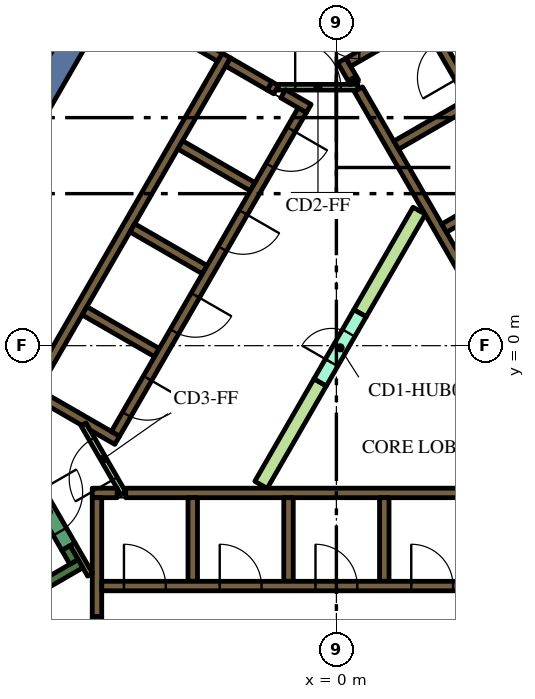
"""IFC4 building model, lengths in metres.
Left out: names, types, materials, properties, quantities, classifications, styles, units other than length and angle.
Written with IfcOpenShell. Run it as: python <this file> out.ifc"""

import sys

from ifc_helpers import new_model, si_unit, direction, frame, frame_2d, origin, place, context, subcontext, project, spatial, polyline, rectangle, outline, extrude, element, fill, save


model = new_model("IFC4")
c1 = context("Model", 3, precision=1e-05, world=origin(), true_north=direction((0.0, 1.0)))
c2 = subcontext(c1, "Body", "Model", "MODEL_VIEW")
j1 = project(units=[si_unit("LENGTHUNIT", "METRE"), si_unit("PLANEANGLEUNIT", "RADIAN")], contexts=[c1])
p1 = place(None, origin())
s1 = spatial("IfcSite", under=j1, at=p1, CompositionType="ELEMENT")
p2 = place(p1, origin())
s2 = spatial("IfcBuilding", under=s1, at=p2, CompositionType="ELEMENT")
p3 = place(p2, frame((0.0, 0.0, 256.2)))
s3 = spatial("IfcBuildingStorey", under=s2, at=p3, CompositionType="ELEMENT", Elevation=256.2)
p4 = place(p3, frame((-12.625, -1.867, 0.0), z_axis=(0.0, 0.0, 1.0), x_axis=(0.499996974394, 0.866027150612, 0.0)))
e1 = element("IfcWall", 1, at=p4, inside=s3, PredefinedType="SOLIDWALL", context=c2, shape_type="SweptSolid", body=[
    extrude(rectangle(XDim=15.858, YDim=0.7, at=frame_2d((7.929, 0.0))), origin(), (0.0, 0.0, 1.0), 5.4),
])
p5 = place(p3, frame((-12.84, -9.261, 0.0), z_axis=(0.0, 0.0, 1.0), x_axis=(0.866016039709, 0.500016218704, 0.0)))
e2 = element("IfcWall", 2, at=p5, inside=s3, PredefinedType="SOLIDWALL", context=c2, shape_type="SweptSolid", body=[
    extrude(rectangle(XDim=7.05, YDim=0.25, at=frame_2d((3.525, 0.0))), origin(), (0.0, 0.0, 1.0), 5.4),
])
p6 = place(p3, frame((-6.905, -5.69, 0.0), z_axis=(0.0, 0.0, 1.0), x_axis=(-0.500402024738, 0.865793170242, 0.0)))
e3 = element("IfcWall", 3, at=p6, inside=s3, PredefinedType="SOLIDWALL", context=c2, shape_type="SweptSolid", body=[
    extrude(rectangle(XDim=0.425, YDim=0.25, at=frame_2d((0.212, 0.0))), origin(), (0.0, 0.0, 1.0), 5.4),
])
p7 = place(p3, frame((-5.545, -3.875, 0.0), z_axis=(0.0, 0.0, 1.0), x_axis=(1.0, 0.0, 0.0)))
e4 = element("IfcWall", 4, at=p7, inside=s3, PredefinedType="SOLIDWALL", context=c2, shape_type="SweptSolid", body=[
    extrude(rectangle(XDim=11.97, YDim=0.25, at=frame_2d((5.985, 0.0))), origin(), (0.0, 0.0, 1.0), 5.4),
])
p8 = place(p3, frame((-6.425, -3.875, 0.0), z_axis=(0.0, 0.0, 1.0), x_axis=(1.0, 0.0, 0.0)))
e5 = element("IfcWall", 5, at=p8, inside=s3, PredefinedType="SOLIDWALL", context=c2, shape_type="SweptSolid", body=[
    extrude(rectangle(XDim=0.658, YDim=0.25, at=frame_2d((0.329, 0.0))), origin(), (0.0, 0.0, 1.0), 5.4),
])
for number, where, z_axis, x_axis in (
    (6, (1.26, -4.0, 0.0), (0.0, 0.0, 1.0), (0.0, -1.0, 0.0)),
    (7, (-1.26, -4.0, 0.0), (0.0, 0.0, 1.0), (0.0, -1.0, 0.0)),
    (8, (-3.78, -4.0, 0.0), (0.0, 0.0, 1.0), (0.0, -1.0, 0.0)),
):
    element("IfcWall", number, at=place(p3, frame(where, z_axis=z_axis, x_axis=x_axis)), inside=s3, PredefinedType="SOLIDWALL", context=c2, shape_type="SweptSolid", body=[
        extrude(rectangle(XDim=2.2, YDim=0.25, at=frame_2d((1.1, 0.0))), origin(), (0.0, 0.0, 1.0), 5.4),
    ])
p9 = place(p3, frame((-6.3, -7.125, 0.0), z_axis=(0.0, 0.0, 1.0), x_axis=(0.0, 1.0, 0.0)))
e9 = element("IfcWall", 9, at=p9, inside=s3, PredefinedType="SOLIDWALL", context=c2, shape_type="SweptSolid", body=[
    extrude(rectangle(XDim=3.125, YDim=0.25, at=frame_2d((1.562, 0.0))), origin(), (0.0, 0.0, 1.0), 5.4),
])
p10 = place(p3, frame((0.473, 6.93, 0.0), z_axis=(0.0, 0.0, 1.0), x_axis=(-0.49972245349, 0.866185586049, 0.0)))
e10 = element("IfcWall", 10, at=p10, inside=s3, PredefinedType="SOLIDWALL", context=c2, shape_type="SweptSolid", body=[
    extrude(rectangle(XDim=0.11, YDim=0.25, at=frame_2d((0.055, 0.0))), origin(), (0.0, 0.0, 1.0), 5.4),
])
p11 = place(p3, frame((6.568, -3.627, 0.0), z_axis=(0.0, 0.0, 1.0), x_axis=(-0.499999455981, 0.866025717874, 0.0)))
e11 = element("IfcWall", 11, at=p11, inside=s3, PredefinedType="SOLIDWALL", context=c2, shape_type="SweptSolid", body=[
    extrude(rectangle(XDim=11.978, YDim=0.25, at=frame_2d((5.989, 0.0))), origin(), (0.0, 0.0, 1.0), 5.4),
])
p12 = place(p3, frame((0.417, 7.027, 0.0), z_axis=(0.0, 0.0, 1.0), x_axis=(-0.500210807569, 0.865903659763, 0.0)))
e12 = element("IfcWall", 12, at=p12, inside=s3, PredefinedType="SOLIDWALL", context=c2, shape_type="SweptSolid", body=[
    extrude(rectangle(XDim=0.548, YDim=0.25, at=frame_2d((0.274, 0.0))), origin(), (0.0, 0.0, 1.0), 5.4),
])
p13 = place(p3, frame((3.647, 9.38, 0.0), z_axis=(0.0, 0.0, 1.0), x_axis=(-0.866025015791, -0.500000672024, 0.0)))
e13 = element("IfcWall", 13, at=p13, inside=s3, PredefinedType="SOLIDWALL", context=c2, shape_type="SweptSolid", body=[
    extrude(rectangle(XDim=3.849, YDim=0.25, at=frame_2d((1.924, 0.0))), origin(), (0.0, 0.0, 1.0), 5.4),
])
p14 = place(p3, frame((1.574, 5.274, 0.0), z_axis=(0.0, 0.0, 1.0), x_axis=(0.866028486751, 0.499994660107, 0.0)))
e14 = element("IfcWall", 14, at=p14, inside=s3, PredefinedType="SOLIDWALL", context=c2, shape_type="SweptSolid", body=[
    extrude(rectangle(XDim=2.2, YDim=0.25, at=frame_2d((1.1, 0.0))), origin(), (0.0, 0.0, 1.0), 5.4),
])
p15 = place(p3, frame((2.834, 3.091, 0.0), z_axis=(0.0, 0.0, 1.0), x_axis=(0.866008176907, 0.50002983664, 0.0)))
e15 = element("IfcWall", 15, at=p15, inside=s3, PredefinedType="SOLIDWALL", context=c2, shape_type="SweptSolid", body=[
    extrude(rectangle(XDim=2.2, YDim=0.25, at=frame_2d((1.1, 0.0))), origin(), (0.0, 0.0, 1.0), 5.4),
])
p16 = place(p3, frame((-8.06, -1.311, 0.0), z_axis=(0.0, 0.0, 1.0), x_axis=(0.50000273126, 0.866023826885, 0.0)))
e16 = element("IfcWall", 16, at=p16, inside=s3, PredefinedType="SOLIDWALL", context=c2, shape_type="SweptSolid", body=[
    extrude(rectangle(XDim=10.33, YDim=0.25, at=frame_2d((5.165, 0.0))), origin(), (0.0, 0.0, 1.0), 5.4),
])
p17 = place(p3, frame((-1.758, 6.835, 0.0), z_axis=(0.0, 0.0, 1.0), x_axis=(0.865982457891, -0.500074377092, 0.0)))
e17 = element("IfcWall", 17, at=p17, inside=s3, PredefinedType="SOLIDWALL", context=c2, shape_type="SweptSolid", body=[
    extrude(rectangle(XDim=0.2, YDim=0.25, at=frame_2d((0.1, 0.0))), origin(), (0.0, 0.0, 1.0), 5.4),
])
p18 = place(p3, frame((-1.76, 6.836, 0.0), z_axis=(0.0, 0.0, 1.0), x_axis=(-0.865952863304, 0.500125622755, 0.0)))
e18 = element("IfcWall", 18, at=p18, inside=s3, PredefinedType="SOLIDWALL", context=c2, shape_type="SweptSolid", body=[
    extrude(rectangle(XDim=1.258, YDim=0.25, at=frame_2d((0.629, 0.0))), origin(), (0.0, 0.0, 1.0), 5.4),
])
p19 = place(p3, frame((-0.728, 6.24, 0.0), z_axis=(0.0, 0.0, 1.0), x_axis=(-0.865955664968, 0.500120771724, 0.0)))
e19 = element("IfcWall", 19, at=p19, inside=s3, PredefinedType="SOLIDWALL", context=c2, shape_type="SweptSolid", body=[
    extrude(rectangle(XDim=0.778, YDim=0.25, at=frame_2d((0.389, 0.0))), origin(), (0.0, 0.0, 1.0), 5.4),
])
for number, where, z_axis, x_axis in (
    (20, (-2.204, 4.182, 0.0), (0.0, 0.0, 1.0), (-0.866, 0.5, 0.0)),
    (21, (-5.369, 3.1, 0.0), (0.0, 0.0, 1.0), (0.866, -0.5, 0.0)),
    (22, (-4.724, -0.182, 0.0), (0.0, 0.0, 1.0), (-0.866, 0.5, 0.0)),
):
    element("IfcWall", number, at=place(p3, frame(where, z_axis=z_axis, x_axis=x_axis)), inside=s3, PredefinedType="SOLIDWALL", context=c2, shape_type="SweptSolid", body=[
        extrude(rectangle(XDim=2.2, YDim=0.25, at=frame_2d((1.1, 0.0))), origin(), (0.0, 0.0, 1.0), 5.4),
    ])
p20 = place(p3, origin())
e23 = element("IfcWall", 23, at=p20, inside=s3, PredefinedType="SOLIDWALL", context=c2, shape_type="SweptSolid", body=[
    extrude(outline(polyline([(-5.922, -2.257), (-5.922, -2.257), (-5.705, -2.382), (-5.83, -2.598), (-6.483, -2.221), (-6.591, -2.033), (-6.591, -2.033), (-6.7, -2.096), (-7.952, -1.373), (-7.827, -1.156), (-5.922, -2.257)])), origin(), (0.0, 0.0, 1.0), 5.4),
])
p21 = place(p3, frame((-3.066, 7.59, 0.0), z_axis=(0.0, 0.0, 1.0), x_axis=(-0.866081358704, 0.49990307071, 0.0)))
e24 = element("IfcWall", 24, at=p21, inside=s3, PredefinedType="SOLIDWALL", context=c2, shape_type="SweptSolid", body=[
    extrude(rectangle(XDim=0.858, YDim=0.25, at=frame_2d((0.429, 0.0))), origin(), (0.0, 0.0, 1.0), 5.4),
])
p22 = place(p3, frame((-6.48, -6.027, 0.0), z_axis=(0.0, 0.0, 1.0), x_axis=(-0.499927229454, 0.866067413802, 0.0)))
e25 = element("IfcWall", 25, at=p22, inside=s3, PredefinedType="PARTITIONING", context=c2, shape_type="SweptSolid", body=[
    extrude(rectangle(XDim=0.929, YDim=0.15, at=frame_2d((0.464, 0.0))), origin(), (0.0, 0.0, 1.0), 5.4),
])
e26 = element("IfcWall", 26, at=p20, inside=s3, PredefinedType="PARTITIONING", context=c2, shape_type="SweptSolid", body=[
    extrude(outline(polyline([(2.017, 3.643), (2.342, 3.456), (0.785, 0.76), (0.46, 0.947), (2.017, 3.643)])), origin(), (0.0, 0.0, 1.0), 4.3),
])
e27 = element("IfcWall", 27, at=p20, inside=s3, PredefinedType="PARTITIONING", context=c2, shape_type="SweptSolid", body=[
    extrude(outline(polyline([(-0.59, -0.872), (-0.265, -1.059), (-1.822, -3.756), (-2.147, -3.568), (-0.59, -0.872)])), origin(), (0.0, 0.0, 1.0), 4.3),
])
p23 = place(p3, frame((-6.175, -6.325, 0.0), z_axis=(0.0, 0.0, 1.0), x_axis=(1.0, 0.0, 0.0)))
e28 = element("IfcWall", 28, at=p23, inside=s3, PredefinedType="SOLIDWALL", context=c2, shape_type="SweptSolid", body=[
    extrude(rectangle(XDim=12.35, YDim=0.25, at=frame_2d((6.175, 0.0))), origin(), (0.0, 0.0, 1.0), 5.4),
])
p24 = place(p23, frame((0.585, 0.0, 0.0)))
e29 = element("IfcOpeningElement", 29, at=p24, cuts=e28, PredefinedType="OPENING", context=c2, shape_type="SweptSolid", body=[
    extrude(rectangle(XDim=1.1, YDim=2.1, at=frame_2d((0.55, 1.05))), frame((0.0, 0.135, 0.0), z_axis=(0.0, -1.0, 0.0), x_axis=(1.0, 0.0, 0.0)), (0.0, 0.0, 1.0), 0.27),
])
p25 = place(p23, frame((3.105, 0.0, 0.0)))
e30 = element("IfcOpeningElement", 30, at=p25, cuts=e28, PredefinedType="OPENING", context=c2, shape_type="SweptSolid", body=[
    extrude(rectangle(XDim=1.1, YDim=2.1, at=frame_2d((0.55, 1.05))), frame((0.0, 0.135, 0.0), z_axis=(0.0, -1.0, 0.0), x_axis=(1.0, 0.0, 0.0)), (0.0, 0.0, 1.0), 0.27),
])
p26 = place(p23, frame((5.625, 0.0, 0.0)))
e31 = element("IfcOpeningElement", 31, at=p26, cuts=e28, PredefinedType="OPENING", context=c2, shape_type="SweptSolid", body=[
    extrude(rectangle(XDim=1.1, YDim=2.1, at=frame_2d((0.55, 1.05))), frame((0.0, 0.135, 0.0), z_axis=(0.0, -1.0, 0.0), x_axis=(1.0, 0.0, 0.0)), (0.0, 0.0, 1.0), 0.27),
])
p27 = place(p23, frame((8.145, 0.0, 0.0)))
e32 = element("IfcOpeningElement", 32, at=p27, cuts=e28, PredefinedType="OPENING", context=c2, shape_type="SweptSolid", body=[
    extrude(rectangle(XDim=1.1, YDim=2.1, at=frame_2d((0.55, 1.05))), frame((0.0, 0.135, 0.0), z_axis=(0.0, -1.0, 0.0), x_axis=(1.0, 0.0, 0.0)), (0.0, 0.0, 1.0), 0.27),
])
p28 = place(p23, frame((10.665, 0.0, 0.0)))
e33 = element("IfcOpeningElement", 33, at=p28, cuts=e28, PredefinedType="OPENING", context=c2, shape_type="SweptSolid", body=[
    extrude(rectangle(XDim=1.1, YDim=2.1, at=frame_2d((0.55, 1.05))), frame((0.0, 0.135, 0.0), z_axis=(0.0, -1.0, 0.0), x_axis=(1.0, 0.0, 0.0)), (0.0, 0.0, 1.0), 0.27),
])
p29 = place(p3, frame((8.565, -2.185, 0.0), z_axis=(0.0, 0.0, 1.0), x_axis=(-0.499997954832, 0.866026584559, 0.0)))
e34 = element("IfcWall", 34, at=p29, inside=s3, PredefinedType="SOLIDWALL", context=c2, shape_type="SweptSolid", body=[
    extrude(rectangle(XDim=12.35, YDim=0.25, at=frame_2d((6.175, 0.0))), origin(), (0.0, 0.0, 1.0), 5.4),
])
p30 = place(p29, frame((0.585, 0.0, 0.0)))
e35 = element("IfcOpeningElement", 35, at=p30, cuts=e34, PredefinedType="OPENING", context=c2, shape_type="SweptSolid", body=[
    extrude(rectangle(XDim=1.1, YDim=2.1, at=frame_2d((0.55, 1.05))), frame((0.0, 0.135, 0.0), z_axis=(0.0, -1.0, 0.0), x_axis=(1.0, 0.0, 0.0)), (0.0, 0.0, 1.0), 0.27),
])
p31 = place(p29, frame((3.105, 0.0, 0.0)))
e36 = element("IfcOpeningElement", 36, at=p31, cuts=e34, PredefinedType="OPENING", context=c2, shape_type="SweptSolid", body=[
    extrude(rectangle(XDim=1.1, YDim=2.1, at=frame_2d((0.55, 1.05))), frame((0.0, 0.135, 0.0), z_axis=(0.0, -1.0, 0.0), x_axis=(1.0, 0.0, 0.0)), (0.0, 0.0, 1.0), 0.27),
])
p32 = place(p29, frame((5.625, 0.0, 0.0)))
e37 = element("IfcOpeningElement", 37, at=p32, cuts=e34, PredefinedType="OPENING", context=c2, shape_type="SweptSolid", body=[
    extrude(rectangle(XDim=1.1, YDim=2.1, at=frame_2d((0.55, 1.05))), frame((0.0, 0.135, 0.0), z_axis=(0.0, -1.0, 0.0), x_axis=(1.0, 0.0, 0.0)), (0.0, 0.0, 1.0), 0.27),
])
p33 = place(p29, frame((8.145, 0.0, 0.0)))
e38 = element("IfcOpeningElement", 38, at=p33, cuts=e34, PredefinedType="OPENING", context=c2, shape_type="SweptSolid", body=[
    extrude(rectangle(XDim=1.1, YDim=2.1, at=frame_2d((0.55, 1.05))), frame((0.0, 0.135, 0.0), z_axis=(0.0, -1.0, 0.0), x_axis=(1.0, 0.0, 0.0)), (0.0, 0.0, 1.0), 0.27),
])
p34 = place(p29, frame((10.665, 0.0, 0.0)))
e39 = element("IfcOpeningElement", 39, at=p34, cuts=e34, PredefinedType="OPENING", context=c2, shape_type="SweptSolid", body=[
    extrude(rectangle(XDim=1.1, YDim=2.1, at=frame_2d((0.55, 1.05))), frame((0.0, 0.135, 0.0), z_axis=(0.0, -1.0, 0.0), x_axis=(1.0, 0.0, 0.0)), (0.0, 0.0, 1.0), 0.27),
])
p35 = place(p3, frame((-0.898, 6.194, 0.0), z_axis=(0.0, 0.0, 1.0), x_axis=(-0.499996202215, -0.866027596426, 0.0)))
e40 = element("IfcWall", 40, at=p35, inside=s3, PredefinedType="SOLIDWALL", context=c2, shape_type="SweptSolid", body=[
    extrude(rectangle(XDim=9.83, YDim=0.25, at=frame_2d((4.915, 0.0))), origin(), (0.0, 0.0, 1.0), 5.4),
])
p36 = place(p35, frame((0.585, 0.0, 0.0)))
e41 = element("IfcOpeningElement", 41, at=p36, cuts=e40, PredefinedType="OPENING", context=c2, shape_type="SweptSolid", body=[
    extrude(rectangle(XDim=1.1, YDim=2.1, at=frame_2d((0.55, 1.05))), frame((0.0, 0.135, 0.0), z_axis=(0.0, -1.0, 0.0), x_axis=(1.0, 0.0, 0.0)), (0.0, 0.0, 1.0), 0.27),
])
p37 = place(p35, frame((3.105, 0.0, 0.0)))
e42 = element("IfcOpeningElement", 42, at=p37, cuts=e40, PredefinedType="OPENING", context=c2, shape_type="SweptSolid", body=[
    extrude(rectangle(XDim=1.1, YDim=2.1, at=frame_2d((0.55, 1.05))), frame((0.0, 0.135, 0.0), z_axis=(0.0, -1.0, 0.0), x_axis=(1.0, 0.0, 0.0)), (0.0, 0.0, 1.0), 0.27),
])
p38 = place(p35, frame((5.625, 0.0, 0.0)))
e43 = element("IfcOpeningElement", 43, at=p38, cuts=e40, PredefinedType="OPENING", context=c2, shape_type="SweptSolid", body=[
    extrude(rectangle(XDim=1.1, YDim=2.1, at=frame_2d((0.55, 1.05))), frame((0.0, 0.135, 0.0), z_axis=(0.0, -1.0, 0.0), x_axis=(1.0, 0.0, 0.0)), (0.0, 0.0, 1.0), 0.27),
])
p39 = place(p35, frame((8.145, 0.0, 0.0)))
e44 = element("IfcOpeningElement", 44, at=p39, cuts=e40, PredefinedType="OPENING", context=c2, shape_type="SweptSolid", body=[
    extrude(rectangle(XDim=1.1, YDim=2.1, at=frame_2d((0.55, 1.05))), frame((0.0, 0.135, 0.0), z_axis=(0.0, -1.0, 0.0), x_axis=(1.0, 0.0, 0.0)), (0.0, 0.0, 1.0), 0.27),
])
p40 = place(p3, frame((-8.103, -3.466, 0.0), z_axis=(0.0, 0.0, 1.0), x_axis=(0.500078061341, -0.865980330357, 0.0)))
e45 = element("IfcWall", 45, at=p40, inside=s3, PredefinedType="SOLIDWALL", context=c2, shape_type="SweptSolid", body=[
    extrude(rectangle(XDim=2.1, YDim=0.4, at=frame_2d((1.05, 0.0))), origin(), (0.0, 0.0, 1.0), 5.4),
])
p41 = place(p40, frame((0.45, 0.0, 0.0)))
e46 = element("IfcOpeningElement", 46, at=p41, cuts=e45, PredefinedType="OPENING", context=c2, shape_type="SweptSolid", body=[
    extrude(rectangle(XDim=1.2, YDim=2.1, at=frame_2d((0.6, 1.05))), frame((0.0, 0.21, 0.0), z_axis=(0.0, -1.0, 0.0), x_axis=(1.0, 0.0, 0.0)), (0.0, 0.0, 1.0), 0.42),
])
p42 = place(p3, frame((-6.3, -7.125, 0.0), z_axis=(0.0, 0.0, 1.0), x_axis=(0.0, -1.0, 0.0)))
e47 = element("IfcWall", 47, at=p42, inside=s3, PredefinedType="SOLIDWALL", context=c2, shape_type="SweptSolid", body=[
    extrude(rectangle(XDim=1.8, YDim=0.25, at=frame_2d((0.9, 0.0))), origin(), (0.0, 0.0, 1.0), 5.4),
])
p43 = place(p42, frame((0.45, 0.0, 0.0)))
e48 = element("IfcOpeningElement", 48, at=p43, cuts=e47, PredefinedType="OPENING", context=c2, shape_type="SweptSolid", body=[
    extrude(rectangle(XDim=0.9, YDim=2.1, at=frame_2d((0.45, 1.05))), frame((0.0, 0.135, 0.0), z_axis=(0.0, -1.0, 0.0), x_axis=(1.0, 0.0, 0.0)), (0.0, 0.0, 1.0), 0.27),
])
p44 = place(p3, frame((-0.427, -0.966, 0.0), z_axis=(0.0, 0.0, 1.0), x_axis=(0.49994051562, 0.866059744384, 0.0)))
e49 = element("IfcWall", 49, at=p44, inside=s3, PredefinedType="PARTITIONING", context=c2, shape_type="SweptSolid", body=[
    extrude(rectangle(XDim=2.1, YDim=0.375, at=frame_2d((1.05, 0.0))), origin(), (0.0, 0.0, 1.0), 4.3),
])
p45 = place(p44, frame((0.6, 0.0, 0.0)))
e50 = element("IfcOpeningElement", 50, at=p45, cuts=e49, PredefinedType="OPENING", context=c2, shape_type="SweptSolid", body=[
    extrude(rectangle(XDim=0.9, YDim=2.1, at=frame_2d((0.45, 1.05))), frame((0.0, 0.198, 0.0), z_axis=(0.0, -1.0, 0.0), x_axis=(1.0, 0.0, 0.0)), (0.0, 0.0, 1.0), 0.395),
])
p46 = place(p3, frame((-1.534, 6.8, 0.0), z_axis=(0.0, 0.0, 1.0), x_axis=(1.0, 0.0, 0.0)))
e51 = element("IfcWall", 51, at=p46, inside=s3, PredefinedType="PARTITIONING", context=c2, shape_type="SweptSolid", body=[
    extrude(rectangle(XDim=2.1, YDim=0.15, at=frame_2d((1.05, 0.0))), origin(), (0.0, 0.0, 1.0), 4.3),
])
p47 = place(p46, frame((0.45, 0.0, 0.0)))
e52 = element("IfcOpeningElement", 52, at=p47, cuts=e51, PredefinedType="OPENING", context=c2, shape_type="SweptSolid", body=[
    extrude(rectangle(XDim=1.2, YDim=2.1, at=frame_2d((0.6, 1.05))), frame((0.0, 0.085, 0.0), z_axis=(0.0, -1.0, 0.0), x_axis=(1.0, 0.0, 0.0)), (0.0, 0.0, 1.0), 0.17),
])
p48 = place(p3, frame((-5.606, -3.89, 0.0), z_axis=(0.0, 0.0, 1.0), x_axis=(-0.500027713859, 0.866009402589, 0.0)))
e53 = element("IfcWall", 53, at=p48, inside=s3, PredefinedType="PARTITIONING", context=c2, shape_type="SweptSolid", body=[
    extrude(rectangle(XDim=2.1, YDim=0.15, at=frame_2d((1.05, 0.0))), origin(), (0.0, 0.0, 1.0), 4.3),
])
p49 = place(p48, frame((0.45, 0.0, 0.0)))
e54 = element("IfcOpeningElement", 54, at=p49, cuts=e53, PredefinedType="OPENING", context=c2, shape_type="SweptSolid", body=[
    extrude(rectangle(XDim=1.2, YDim=2.1, at=frame_2d((0.6, 1.05))), frame((0.0, 0.085, 0.0), z_axis=(0.0, -1.0, 0.0), x_axis=(1.0, 0.0, 0.0)), (0.0, 0.0, 1.0), 0.17),
])
p50 = place(p24, origin())
e55 = element("IfcDoor", 55, at=p50, inside=s3, OperationType="DOUBLE_DOOR_SLIDING", PredefinedType="DOOR", context=c2, shape_type="SweptSolid", body=[
    extrude(rectangle(XDim=1.1, YDim=2.1, at=frame_2d((0.55, 1.05))), frame((0.0, 0.025, 0.0), z_axis=(0.0, -1.0, 0.0), x_axis=(1.0, 0.0, 0.0)), (0.0, 0.0, 1.0), 0.05),
])
fill(e29, e55)
p51 = place(p25, origin())
e56 = element("IfcDoor", 56, at=p51, inside=s3, OperationType="DOUBLE_DOOR_SLIDING", PredefinedType="DOOR", context=c2, shape_type="SweptSolid", body=[
    extrude(rectangle(XDim=1.1, YDim=2.1, at=frame_2d((0.55, 1.05))), frame((0.0, 0.025, 0.0), z_axis=(0.0, -1.0, 0.0), x_axis=(1.0, 0.0, 0.0)), (0.0, 0.0, 1.0), 0.05),
])
fill(e30, e56)
p52 = place(p26, origin())
e57 = element("IfcDoor", 57, at=p52, inside=s3, OperationType="DOUBLE_DOOR_SLIDING", PredefinedType="DOOR", context=c2, shape_type="SweptSolid", body=[
    extrude(rectangle(XDim=1.1, YDim=2.1, at=frame_2d((0.55, 1.05))), frame((0.0, 0.025, 0.0), z_axis=(0.0, -1.0, 0.0), x_axis=(1.0, 0.0, 0.0)), (0.0, 0.0, 1.0), 0.05),
])
fill(e31, e57)
p53 = place(p27, origin())
e58 = element("IfcDoor", 58, at=p53, inside=s3, OperationType="DOUBLE_DOOR_SLIDING", PredefinedType="DOOR", context=c2, shape_type="SweptSolid", body=[
    extrude(rectangle(XDim=1.1, YDim=2.1, at=frame_2d((0.55, 1.05))), frame((0.0, 0.025, 0.0), z_axis=(0.0, -1.0, 0.0), x_axis=(1.0, 0.0, 0.0)), (0.0, 0.0, 1.0), 0.05),
])
fill(e32, e58)
p54 = place(p34, origin())
e59 = element("IfcDoor", 59, at=p54, inside=s3, OperationType="DOUBLE_DOOR_SLIDING", PredefinedType="DOOR", context=c2, shape_type="SweptSolid", body=[
    extrude(rectangle(XDim=1.1, YDim=2.1, at=frame_2d((0.55, 1.05))), frame((0.0, 0.025, 0.0), z_axis=(0.0, -1.0, 0.0), x_axis=(1.0, 0.0, 0.0)), (0.0, 0.0, 1.0), 0.05),
])
fill(e39, e59)
p55 = place(p36, origin())
e60 = element("IfcDoor", 60, at=p55, inside=s3, OperationType="DOUBLE_DOOR_SLIDING", PredefinedType="DOOR", context=c2, shape_type="SweptSolid", body=[
    extrude(rectangle(XDim=1.1, YDim=2.1, at=frame_2d((0.55, 1.05))), frame((0.0, 0.025, 0.0), z_axis=(0.0, -1.0, 0.0), x_axis=(1.0, 0.0, 0.0)), (0.0, 0.0, 1.0), 0.05),
])
fill(e41, e60)
p56 = place(p37, origin())
e61 = element("IfcDoor", 61, at=p56, inside=s3, OperationType="DOUBLE_DOOR_SLIDING", PredefinedType="DOOR", context=c2, shape_type="SweptSolid", body=[
    extrude(rectangle(XDim=1.1, YDim=2.1, at=frame_2d((0.55, 1.05))), frame((0.0, 0.025, 0.0), z_axis=(0.0, -1.0, 0.0), x_axis=(1.0, 0.0, 0.0)), (0.0, 0.0, 1.0), 0.05),
])
fill(e42, e61)
p57 = place(p38, origin())
e62 = element("IfcDoor", 62, at=p57, inside=s3, OperationType="DOUBLE_DOOR_SLIDING", PredefinedType="DOOR", context=c2, shape_type="SweptSolid", body=[
    extrude(rectangle(XDim=1.1, YDim=2.1, at=frame_2d((0.55, 1.05))), frame((0.0, 0.025, 0.0), z_axis=(0.0, -1.0, 0.0), x_axis=(1.0, 0.0, 0.0)), (0.0, 0.0, 1.0), 0.05),
])
fill(e43, e62)
p58 = place(p39, origin())
e63 = element("IfcDoor", 63, at=p58, inside=s3, OperationType="DOUBLE_DOOR_SLIDING", PredefinedType="DOOR", context=c2, shape_type="SweptSolid", body=[
    extrude(rectangle(XDim=1.1, YDim=2.1, at=frame_2d((0.55, 1.05))), frame((0.0, 0.025, 0.0), z_axis=(0.0, -1.0, 0.0), x_axis=(1.0, 0.0, 0.0)), (0.0, 0.0, 1.0), 0.05),
])
fill(e44, e63)
p59 = place(p41, origin())
e64 = element("IfcDoor", 64, at=p59, inside=s3, OperationType="SINGLE_SWING_LEFT", PredefinedType="DOOR", context=c2, shape_type="SweptSolid", body=[
    extrude(rectangle(XDim=1.2, YDim=2.1, at=frame_2d((0.6, 1.05))), frame((0.0, 0.025, 0.0), z_axis=(0.0, -1.0, 0.0), x_axis=(1.0, 0.0, 0.0)), (0.0, 0.0, 1.0), 0.05),
])
fill(e46, e64)
p60 = place(p45, origin())
e65 = element("IfcDoor", 65, at=p60, inside=s3, OperationType="SINGLE_SWING_LEFT", PredefinedType="DOOR", context=c2, shape_type="SweptSolid", body=[
    extrude(rectangle(XDim=0.9, YDim=2.1, at=frame_2d((0.45, 1.05))), frame((0.0, 0.025, 0.0), z_axis=(0.0, -1.0, 0.0), x_axis=(1.0, 0.0, 0.0)), (0.0, 0.0, 1.0), 0.05),
])
fill(e50, e65)
p61 = place(p47, origin())
e66 = element("IfcDoor", 66, at=p61, inside=s3, OperationType="SINGLE_SWING_LEFT", PredefinedType="DOOR", context=c2, shape_type="SweptSolid", body=[
    extrude(rectangle(XDim=1.2, YDim=2.1, at=frame_2d((0.6, 1.05))), frame((0.0, 0.025, 0.0), z_axis=(0.0, -1.0, 0.0), x_axis=(1.0, 0.0, 0.0)), (0.0, 0.0, 1.0), 0.05),
])
fill(e52, e66)
p62 = place(p49, origin())
e67 = element("IfcDoor", 67, at=p62, inside=s3, OperationType="SINGLE_SWING_LEFT", PredefinedType="DOOR", context=c2, shape_type="SweptSolid", body=[
    extrude(rectangle(XDim=1.2, YDim=2.1, at=frame_2d((0.6, 1.05))), frame((0.0, 0.025, 0.0), z_axis=(0.0, -1.0, 0.0), x_axis=(1.0, 0.0, 0.0)), (0.0, 0.0, 1.0), 0.05),
])
fill(e54, e67)
save(model, sys.argv[1])
